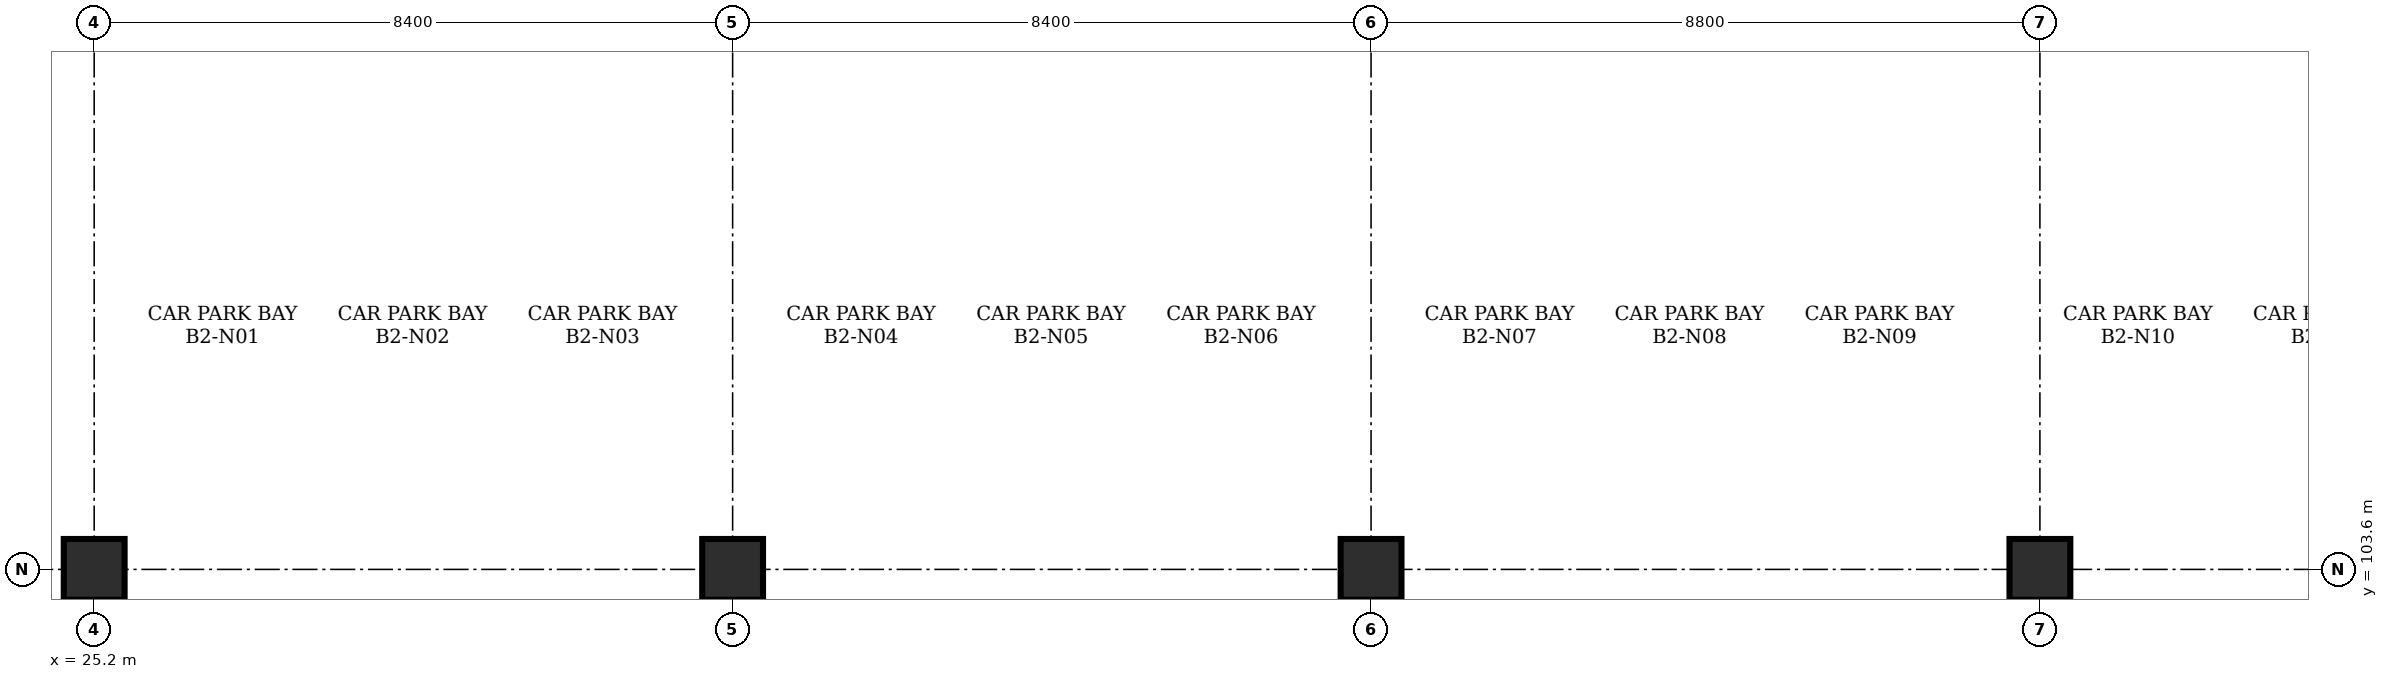
"""IFC4 building model, lengths in metres.
Left out: names, types, materials, properties, quantities, classifications, styles, units other than length and angle.
Written with IfcOpenShell. Run it as: python <this file> out.ifc"""

import sys

from ifc_helpers import new_model, si_unit, direction, frame, origin, origin_2d, place, context, subcontext, project, spatial, rectangle, extrude, element, save


model = new_model("IFC4")
c1 = context("Model", 3, precision=1e-05, world=origin(), true_north=direction((0.0, 1.0)))
c2 = subcontext(c1, "Body", "Model", "MODEL_VIEW")
j1 = project(units=[si_unit("LENGTHUNIT", "METRE"), si_unit("PLANEANGLEUNIT", "RADIAN")], contexts=[c1])
p1 = place(None, origin())
s1 = spatial("IfcSite", under=j1, at=p1, CompositionType="ELEMENT")
p2 = place(p1, origin())
s2 = spatial("IfcBuilding", under=s1, at=p2, CompositionType="ELEMENT")
p3 = place(p2, frame((0.0, 0.0, -9.6)))
s3 = spatial("IfcBuildingStorey", under=s2, at=p3, CompositionType="ELEMENT", Elevation=-9.6)
for number, where, z_axis, x_axis in (
    (1, (25.2, 103.6, 0.0), (0.0, 0.0, 1.0), (1.0, 0.0, 0.0)),
    (2, (33.6, 103.6, 0.0), (0.0, 0.0, 1.0), (1.0, 0.0, 0.0)),
    (3, (42.0, 103.6, 0.0), (0.0, 0.0, 1.0), (1.0, 0.0, 0.0)),
    (4, (50.8, 103.6, 0.0), (0.0, 0.0, 1.0), (1.0, 0.0, 0.0)),
):
    element("IfcColumn", number, at=place(p3, frame(where, z_axis=z_axis, x_axis=x_axis)), inside=s3, PredefinedType="COLUMN", context=c2, shape_type="SweptSolid", body=[
        extrude(rectangle(XDim=0.8, YDim=0.8, at=origin_2d()), origin(), (0.0, 0.0, 1.0), 4.48),
    ])
save(model, sys.argv[1])
